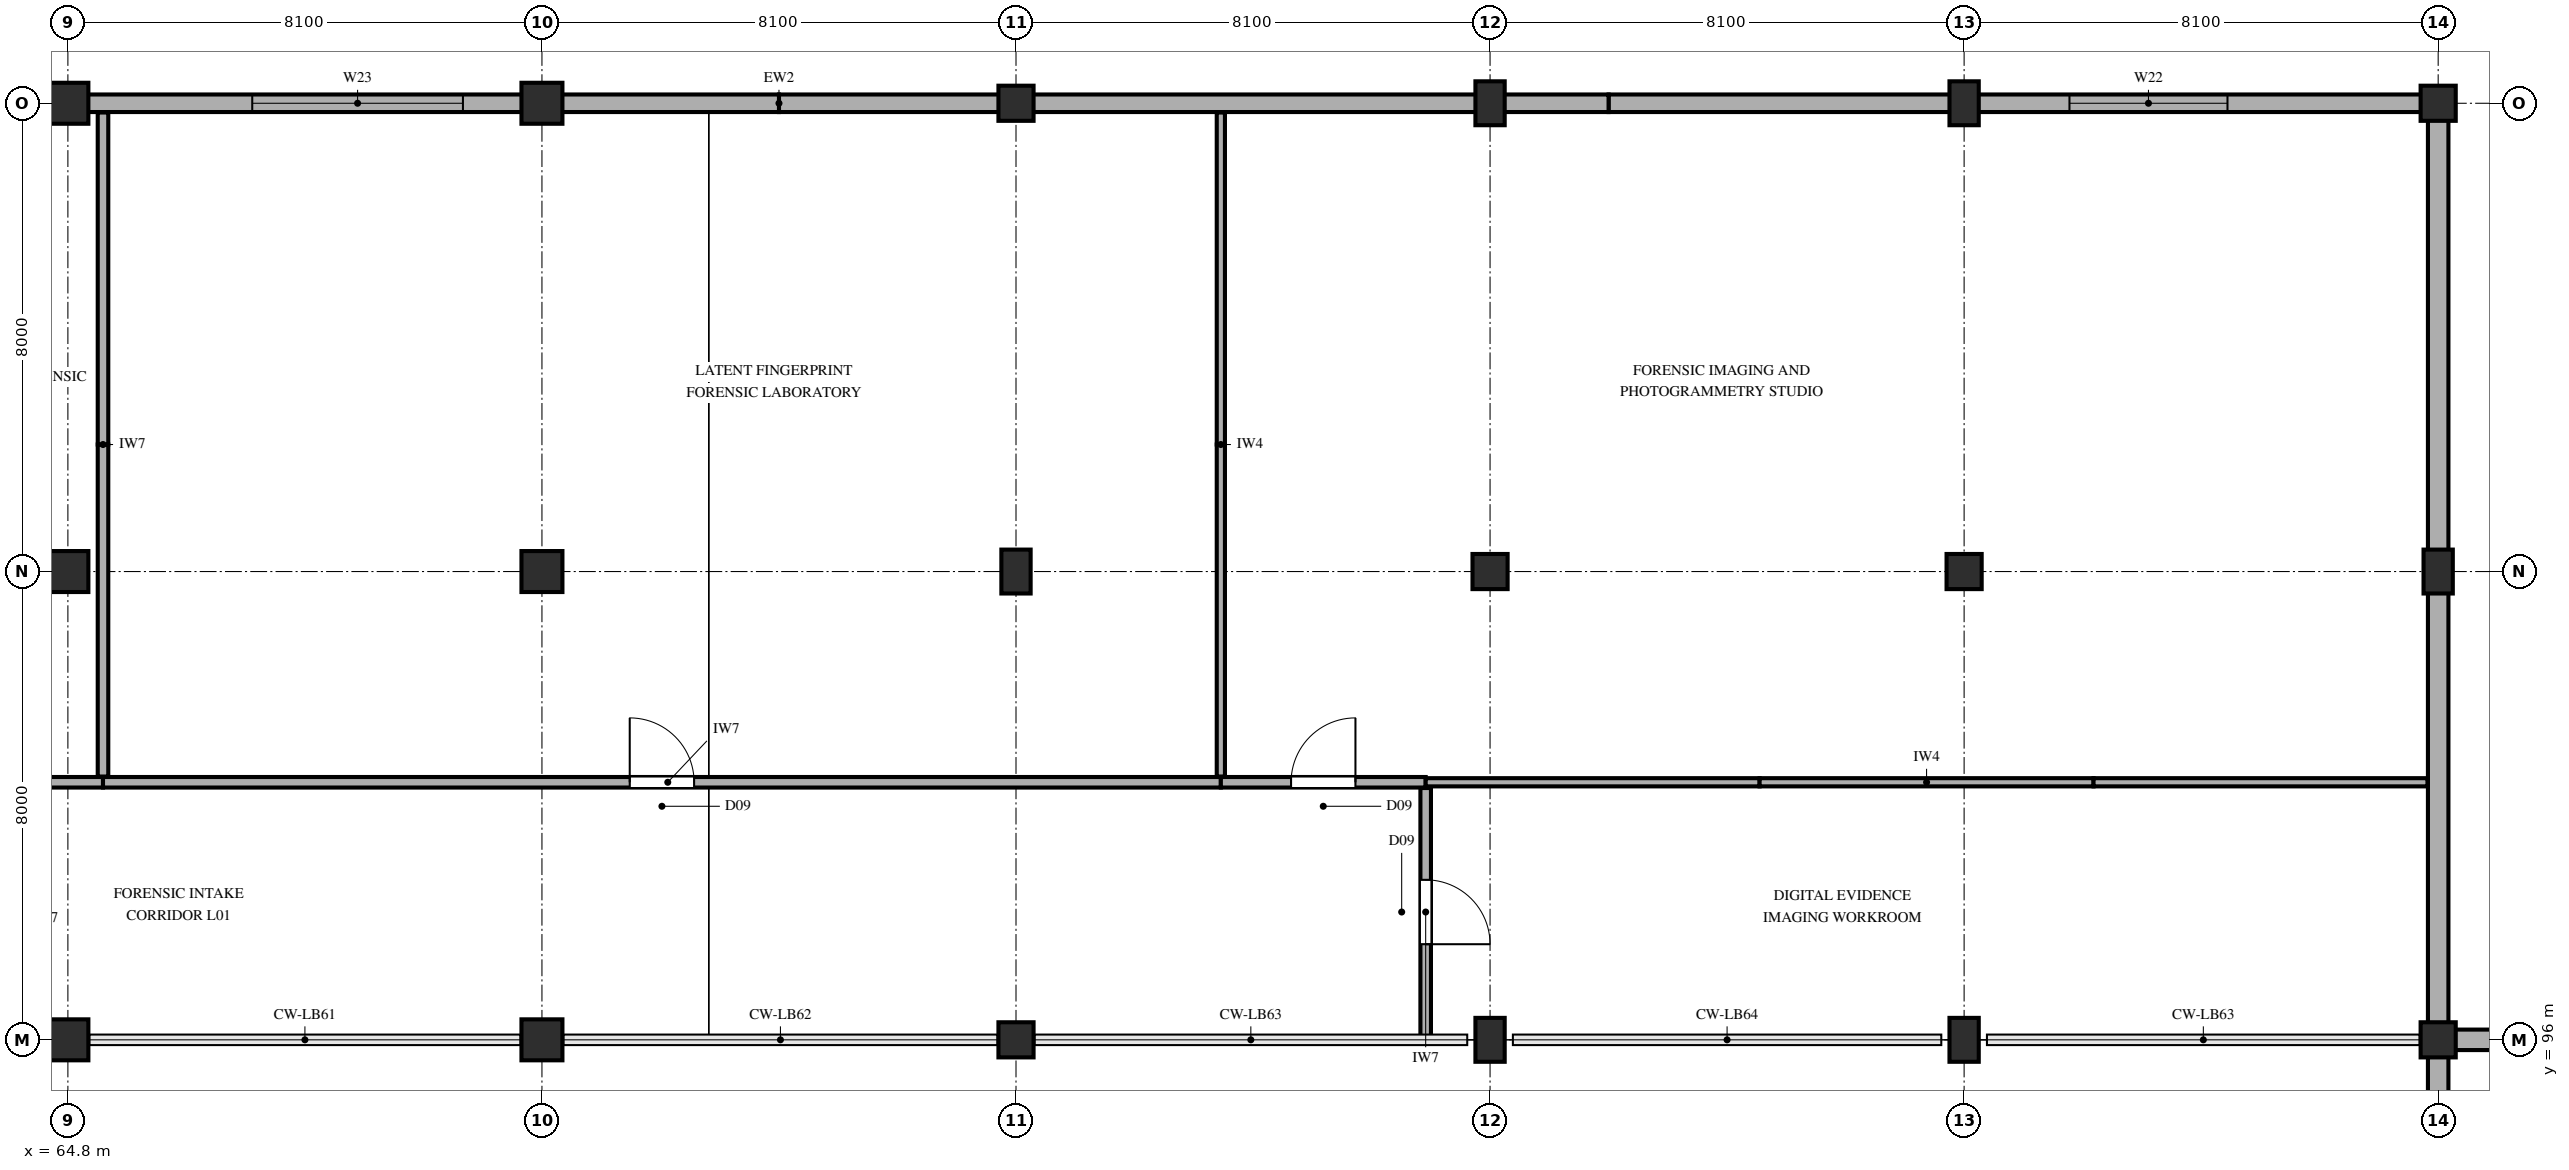
"""IFC4 building model, lengths in metres.
Left out: names, types, materials, properties, quantities, classifications, styles, units other than length and angle.
Written with IfcOpenShell. Run it as: python <this file> out.ifc"""

import sys

from ifc_helpers import new_model, si_unit, direction, frame, frame_2d, origin, origin_2d, place, context, subcontext, project, spatial, rectangle, extrude, element, fill, save


model = new_model("IFC4")
c1 = context("Model", 3, precision=1e-05, world=origin(), true_north=direction((0.0, 1.0)))
c2 = subcontext(c1, "Body", "Model", "MODEL_VIEW")
j1 = project(units=[si_unit("LENGTHUNIT", "METRE"), si_unit("PLANEANGLEUNIT", "RADIAN")], contexts=[c1])
p1 = place(None, origin())
s1 = spatial("IfcSite", under=j1, at=p1, CompositionType="ELEMENT")
p2 = place(p1, origin())
s2 = spatial("IfcBuilding", under=s1, at=p2, CompositionType="ELEMENT")
p3 = place(p2, frame((0.0, 0.0, 5.4)))
s3 = spatial("IfcBuildingStorey", under=s2, at=p3, CompositionType="ELEMENT", Elevation=5.4)
for number, where, z_axis, x_axis in (
    (1, (64.8, 96.0, 0.0), (0.0, 0.0, 1.0), (1.0, 0.0, 0.0)),
    (2, (64.8, 104.0, 0.0), (0.0, 0.0, 1.0), (1.0, 0.0, 0.0)),
    (3, (64.8, 112.0, 0.0), (0.0, 0.0, 1.0), (1.0, 0.0, 0.0)),
    (4, (72.9, 96.0, 0.0), (0.0, 0.0, 1.0), (1.0, 0.0, 0.0)),
    (5, (72.9, 104.0, 0.0), (0.0, 0.0, 1.0), (1.0, 0.0, 0.0)),
    (6, (72.9, 112.0, 0.0), (0.0, 0.0, 1.0), (1.0, 0.0, 0.0)),
):
    element("IfcColumn", number, at=place(p3, frame(where, z_axis=z_axis, x_axis=x_axis)), inside=s3, PredefinedType="COLUMN", context=c2, shape_type="SweptSolid", body=[
        extrude(rectangle(XDim=0.7, YDim=0.7, at=origin_2d()), origin(), (0.0, 0.0, 1.0), 4.8),
    ])
p4 = place(p3, frame((81.0, 96.0, 0.0), z_axis=(0.0, 0.0, 1.0), x_axis=(1.0, 0.0, 0.0)))
e7 = element("IfcColumn", 7, at=p4, inside=s3, PredefinedType="COLUMN", context=c2, shape_type="SweptSolid", body=[
    extrude(rectangle(XDim=0.6, YDim=0.6, at=origin_2d()), origin(), (0.0, 0.0, 1.0), 4.8),
])
p5 = place(p3, frame((81.0, 104.0, 0.0), z_axis=(0.0, 0.0, 1.0), x_axis=(1.0, 0.0, 0.0)))
e8 = element("IfcColumn", 8, at=p5, inside=s3, PredefinedType="COLUMN", context=c2, shape_type="SweptSolid", body=[
    extrude(rectangle(XDim=0.5, YDim=0.75, at=origin_2d()), origin(), (0.0, 0.0, 1.0), 4.8),
])
p6 = place(p3, frame((81.0, 112.0, 0.0), z_axis=(0.0, 0.0, 1.0), x_axis=(1.0, 0.0, 0.0)))
e9 = element("IfcColumn", 9, at=p6, inside=s3, PredefinedType="COLUMN", context=c2, shape_type="SweptSolid", body=[
    extrude(rectangle(XDim=0.6, YDim=0.6, at=origin_2d()), origin(), (0.0, 0.0, 1.0), 4.8),
])
p7 = place(p3, frame((89.1, 96.0, 0.0), z_axis=(0.0, 0.0, 1.0), x_axis=(1.0, 0.0, 0.0)))
e10 = element("IfcColumn", 10, at=p7, inside=s3, PredefinedType="COLUMN", context=c2, shape_type="SweptSolid", body=[
    extrude(rectangle(XDim=0.5, YDim=0.75, at=origin_2d()), origin(), (0.0, 0.0, 1.0), 4.8),
])
p8 = place(p3, frame((89.1, 104.0, 0.0), z_axis=(0.0, 0.0, 1.0), x_axis=(1.0, 0.0, 0.0)))
e11 = element("IfcColumn", 11, at=p8, inside=s3, PredefinedType="COLUMN", context=c2, shape_type="SweptSolid", body=[
    extrude(rectangle(XDim=0.6, YDim=0.6, at=origin_2d()), origin(), (0.0, 0.0, 1.0), 4.8),
])
for number, where, z_axis, x_axis in (
    (12, (89.1, 112.0, 0.0), (0.0, 0.0, 1.0), (1.0, 0.0, 0.0)),
    (13, (97.2, 96.0, 0.0), (0.0, 0.0, 1.0), (1.0, 0.0, 0.0)),
):
    element("IfcColumn", number, at=place(p3, frame(where, z_axis=z_axis, x_axis=x_axis)), inside=s3, PredefinedType="COLUMN", context=c2, shape_type="SweptSolid", body=[
        extrude(rectangle(XDim=0.5, YDim=0.75, at=origin_2d()), origin(), (0.0, 0.0, 1.0), 4.8),
    ])
p9 = place(p3, frame((97.2, 104.0, 0.0), z_axis=(0.0, 0.0, 1.0), x_axis=(1.0, 0.0, 0.0)))
e14 = element("IfcColumn", 14, at=p9, inside=s3, PredefinedType="COLUMN", context=c2, shape_type="SweptSolid", body=[
    extrude(rectangle(XDim=0.6, YDim=0.6, at=origin_2d()), origin(), (0.0, 0.0, 1.0), 4.8),
])
p10 = place(p3, frame((97.2, 112.0, 0.0), z_axis=(0.0, 0.0, 1.0), x_axis=(1.0, 0.0, 0.0)))
e15 = element("IfcColumn", 15, at=p10, inside=s3, PredefinedType="COLUMN", context=c2, shape_type="SweptSolid", body=[
    extrude(rectangle(XDim=0.5, YDim=0.75, at=origin_2d()), origin(), (0.0, 0.0, 1.0), 4.8),
])
p11 = place(p3, frame((105.3, 96.0, 0.0), z_axis=(0.0, 0.0, 1.0), x_axis=(1.0, 0.0, 0.0)))
e16 = element("IfcColumn", 16, at=p11, inside=s3, PredefinedType="COLUMN", context=c2, shape_type="SweptSolid", body=[
    extrude(rectangle(XDim=0.6, YDim=0.6, at=origin_2d()), origin(), (0.0, 0.0, 1.0), 4.8),
])
p12 = place(p3, frame((105.3, 104.0, 0.0), z_axis=(0.0, 0.0, 1.0), x_axis=(1.0, 0.0, 0.0)))
e17 = element("IfcColumn", 17, at=p12, inside=s3, PredefinedType="COLUMN", context=c2, shape_type="SweptSolid", body=[
    extrude(rectangle(XDim=0.5, YDim=0.75, at=origin_2d()), origin(), (0.0, 0.0, 1.0), 4.8),
])
p13 = place(p3, frame((105.3, 112.0, 0.0), z_axis=(0.0, 0.0, 1.0), x_axis=(1.0, 0.0, 0.0)))
e18 = element("IfcColumn", 18, at=p13, inside=s3, PredefinedType="COLUMN", context=c2, shape_type="SweptSolid", body=[
    extrude(rectangle(XDim=0.6, YDim=0.6, at=origin_2d()), origin(), (0.0, 0.0, 1.0), 4.8),
])
p14 = place(p3, frame((105.3, 96.18, 0.0), z_axis=(0.0, 0.0, 1.0), x_axis=(0.0, 1.0, 0.0)))
e19 = element("IfcWall", 19, at=p14, inside=s3, PredefinedType="SOLIDWALL", context=c2, shape_type="SweptSolid", body=[
    extrude(rectangle(XDim=15.82, YDim=0.35, at=frame_2d((7.91, 0.0))), origin(), (0.0, 0.0, 1.0), 3.912),
])
p15 = place(p3, frame((105.3, 112.0, 0.0), z_axis=(0.0, 0.0, 1.0), x_axis=(-1.0, 0.0, 0.0)))
e20 = element("IfcWall", 20, at=p15, inside=s3, PredefinedType="SOLIDWALL", context=c2, shape_type="SweptSolid", body=[
    extrude(rectangle(XDim=14.175, YDim=0.3, at=frame_2d((7.087, 0.0))), origin(), (0.0, 0.0, 1.0), 3.812),
])
p16 = place(p15, frame((3.6, 0.0, 0.95)))
e21 = element("IfcOpeningElement", 21, at=p16, cuts=e20, PredefinedType="OPENING", context=c2, shape_type="SweptSolid", body=[
    extrude(rectangle(XDim=2.7, YDim=0.9, at=frame_2d((1.35, 0.45))), frame((0.0, 0.16, 0.0), z_axis=(0.0, -1.0, 0.0), x_axis=(1.0, 0.0, 0.0)), (0.0, 0.0, 1.0), 0.32),
])
p17 = place(p3, frame((91.125, 112.0, 0.0), z_axis=(0.0, 0.0, 1.0), x_axis=(-1.0, 0.0, 0.0)))
e22 = element("IfcWall", 22, at=p17, inside=s3, PredefinedType="SOLIDWALL", context=c2, shape_type="SweptSolid", body=[
    extrude(rectangle(XDim=14.175, YDim=0.3, at=frame_2d((7.087, 0.0))), origin(), (0.0, 0.0, 1.0), 3.812),
])
p18 = place(p3, frame((76.95, 112.0, 0.0), z_axis=(0.0, 0.0, 1.0), x_axis=(-1.0, 0.0, 0.0)))
e23 = element("IfcWall", 23, at=p18, inside=s3, PredefinedType="SOLIDWALL", context=c2, shape_type="SweptSolid", body=[
    extrude(rectangle(XDim=14.175, YDim=0.3, at=frame_2d((7.087, 0.0))), origin(), (0.0, 0.0, 1.0), 3.812),
])
p19 = place(p18, frame((5.4, 0.0, 0.95)))
e24 = element("IfcOpeningElement", 24, at=p19, cuts=e23, PredefinedType="OPENING", context=c2, shape_type="SweptSolid", body=[
    extrude(rectangle(XDim=3.6, YDim=0.9, at=frame_2d((1.8, 0.45))), frame((0.0, 0.16, 0.0), z_axis=(0.0, -1.0, 0.0), x_axis=(1.0, 0.0, 0.0)), (0.0, 0.0, 1.0), 0.32),
])
p20 = place(p3, frame((117.54, 96.0, 0.0), z_axis=(0.0, 0.0, 1.0), x_axis=(-1.0, 0.0, 0.0)))
e25 = element("IfcWall", 25, at=p20, inside=s3, PredefinedType="SOLIDWALL", context=c2, shape_type="SweptSolid", body=[
    extrude(rectangle(XDim=12.06, YDim=0.35, at=frame_2d((6.03, 0.0))), origin(), (0.0, 0.0, 1.0), 3.312),
])
p21 = place(p20, frame((6.75, 0.0, 0.95)))
e26 = element("IfcOpeningElement", 26, at=p21, cuts=e25, PredefinedType="OPENING", context=c2, shape_type="SweptSolid", body=[
    extrude(rectangle(XDim=2.7, YDim=1.8, at=frame_2d((1.35, 0.9))), frame((0.0, 0.185, 0.0), z_axis=(0.0, -1.0, 0.0), x_axis=(1.0, 0.0, 0.0)), (0.0, 0.0, 1.0), 0.37),
])
p22 = place(p3, frame((105.3, 95.82, 0.0), z_axis=(0.0, 0.0, 1.0), x_axis=(0.0, -1.0, 0.0)))
e27 = element("IfcWall", 27, at=p22, inside=s3, PredefinedType="SOLIDWALL", context=c2, shape_type="SweptSolid", body=[
    extrude(rectangle(XDim=13.273, YDim=0.35, at=frame_2d((6.637, 0.0))), origin(), (0.0, 0.0, 1.0), 3.912),
])
p23 = place(p22, frame((3.15, 0.0, 0.85)))
e28 = element("IfcOpeningElement", 28, at=p23, cuts=e27, PredefinedType="OPENING", context=c2, shape_type="SweptSolid", body=[
    extrude(rectangle(XDim=2.7, YDim=2.1, at=frame_2d((1.35, 1.05))), frame((0.0, 0.185, 0.0), z_axis=(0.0, -1.0, 0.0), x_axis=(1.0, 0.0, 0.0)), (0.0, 0.0, 1.0), 0.37),
])
p24 = place(p3, frame((62.1, 100.4, 0.0), z_axis=(0.0, 0.0, 1.0), x_axis=(1.0, 0.0, 0.0)))
e29 = element("IfcWall", 29, at=p24, inside=s3, PredefinedType="PARTITIONING", context=c2, shape_type="SweptSolid", body=[
    extrude(rectangle(XDim=3.3, YDim=0.18, at=frame_2d((1.65, 0.0))), origin(), (0.0, 0.0, 1.0), 4.52),
])
p25 = place(p24, frame((1.05, 0.0, 0.0)))
e30 = element("IfcOpeningElement", 30, at=p25, cuts=e29, PredefinedType="OPENING", context=c2, shape_type="SweptSolid", body=[
    extrude(rectangle(XDim=1.2, YDim=2.2, at=frame_2d((0.6, 1.1))), frame((0.0, 0.1, 0.0), z_axis=(0.0, -1.0, 0.0), x_axis=(1.0, 0.0, 0.0)), (0.0, 0.0, 1.0), 0.2),
])
p26 = place(p3, frame((65.4, 100.4, 0.0), z_axis=(0.0, 0.0, 1.0), x_axis=(1.0, 0.0, 0.0)))
e31 = element("IfcWall", 31, at=p26, inside=s3, PredefinedType="PARTITIONING", context=c2, shape_type="SweptSolid", body=[
    extrude(rectangle(XDim=19.1, YDim=0.18, at=frame_2d((9.55, 0.0))), origin(), (0.0, 0.0, 1.0), 4.52),
])
p27 = place(p26, frame((9.0, 0.0, 0.0)))
e32 = element("IfcOpeningElement", 32, at=p27, cuts=e31, PredefinedType="OPENING", context=c2, shape_type="SweptSolid", body=[
    extrude(rectangle(XDim=1.1, YDim=2.3, at=frame_2d((0.55, 1.15))), frame((0.0, 0.1, 0.0), z_axis=(0.0, -1.0, 0.0), x_axis=(1.0, 0.0, 0.0)), (0.0, 0.0, 1.0), 0.2),
])
p28 = place(p3, frame((84.5, 100.4, 0.0), z_axis=(0.0, 0.0, 1.0), x_axis=(1.0, 0.0, 0.0)))
e33 = element("IfcWall", 33, at=p28, inside=s3, PredefinedType="PARTITIONING", context=c2, shape_type="SweptSolid", body=[
    extrude(rectangle(XDim=3.5, YDim=0.18, at=frame_2d((1.75, 0.0))), origin(), (0.0, 0.0, 1.0), 4.52),
])
p29 = place(p28, frame((1.2, 0.0, 0.0)))
e34 = element("IfcOpeningElement", 34, at=p29, cuts=e33, PredefinedType="OPENING", context=c2, shape_type="SweptSolid", body=[
    extrude(rectangle(XDim=1.1, YDim=2.3, at=frame_2d((0.55, 1.15))), frame((0.0, 0.1, 0.0), z_axis=(0.0, -1.0, 0.0), x_axis=(1.0, 0.0, 0.0)), (0.0, 0.0, 1.0), 0.2),
])
p30 = place(p3, frame((88.0, 100.4, 0.0), z_axis=(0.0, 0.0, 1.0), x_axis=(1.0, 0.0, 0.0)))
e35 = element("IfcWall", 35, at=p30, inside=s3, PredefinedType="PARTITIONING", context=c2, shape_type="SweptSolid", body=[
    extrude(rectangle(XDim=5.706, YDim=0.14, at=frame_2d((2.853, 0.0))), origin(), (0.0, 0.0, 1.0), 4.52),
])
p31 = place(p3, frame((93.706, 100.4, 0.0), z_axis=(0.0, 0.0, 1.0), x_axis=(1.0, 0.0, 0.0)))
e36 = element("IfcWall", 36, at=p31, inside=s3, PredefinedType="PARTITIONING", context=c2, shape_type="SweptSolid", body=[
    extrude(rectangle(XDim=5.706, YDim=0.14, at=frame_2d((2.853, 0.0))), origin(), (0.0, 0.0, 1.0), 4.52),
])
p32 = place(p3, frame((99.411, 100.4, 0.0), z_axis=(0.0, 0.0, 1.0), x_axis=(1.0, 0.0, 0.0)))
e37 = element("IfcWall", 37, at=p32, inside=s3, PredefinedType="PARTITIONING", context=c2, shape_type="SweptSolid", body=[
    extrude(rectangle(XDim=5.706, YDim=0.14, at=frame_2d((2.853, 0.0))), origin(), (0.0, 0.0, 1.0), 4.52),
])
p33 = place(p3, frame((65.4, 100.498, 0.0), z_axis=(0.0, 0.0, 1.0), x_axis=(0.0, 1.0, 0.0)))
e38 = element("IfcWall", 38, at=p33, inside=s3, PredefinedType="PARTITIONING", context=c2, shape_type="SweptSolid", body=[
    extrude(rectangle(XDim=5.672, YDim=0.18, at=frame_2d((2.836, 0.0))), origin(), (0.0, 0.0, 1.0), 4.52),
])
p34 = place(p3, frame((65.4, 106.17, 0.0), z_axis=(0.0, 0.0, 1.0), x_axis=(0.0, 1.0, 0.0)))
e39 = element("IfcWall", 39, at=p34, inside=s3, PredefinedType="PARTITIONING", context=c2, shape_type="SweptSolid", body=[
    extrude(rectangle(XDim=5.672, YDim=0.18, at=frame_2d((2.836, 0.0))), origin(), (0.0, 0.0, 1.0), 4.52),
])
p35 = place(p3, frame((84.5, 100.498, 0.0), z_axis=(0.0, 0.0, 1.0), x_axis=(0.0, 1.0, 0.0)))
e40 = element("IfcWall", 40, at=p35, inside=s3, PredefinedType="PARTITIONING", context=c2, shape_type="SweptSolid", body=[
    extrude(rectangle(XDim=5.672, YDim=0.14, at=frame_2d((2.836, 0.0))), origin(), (0.0, 0.0, 1.0), 4.52),
])
p36 = place(p3, frame((84.5, 106.17, 0.0), z_axis=(0.0, 0.0, 1.0), x_axis=(0.0, 1.0, 0.0)))
e41 = element("IfcWall", 41, at=p36, inside=s3, PredefinedType="PARTITIONING", context=c2, shape_type="SweptSolid", body=[
    extrude(rectangle(XDim=5.672, YDim=0.14, at=frame_2d((2.836, 0.0))), origin(), (0.0, 0.0, 1.0), 4.52),
])
p37 = place(p3, frame((88.0, 96.065, 0.0), z_axis=(0.0, 0.0, 1.0), x_axis=(0.0, 1.0, 0.0)))
e42 = element("IfcWall", 42, at=p37, inside=s3, PredefinedType="PARTITIONING", context=c2, shape_type="SweptSolid", body=[
    extrude(rectangle(XDim=4.237, YDim=0.18, at=frame_2d((2.119, 0.0))), origin(), (0.0, 0.0, 1.0), 4.52),
])
p38 = place(p37, frame((1.569, 0.0, 0.0)))
e43 = element("IfcOpeningElement", 43, at=p38, cuts=e42, PredefinedType="OPENING", context=c2, shape_type="SweptSolid", body=[
    extrude(rectangle(XDim=1.1, YDim=2.3, at=frame_2d((0.55, 1.15))), frame((0.0, 0.1, 0.0), z_axis=(0.0, -1.0, 0.0), x_axis=(1.0, 0.0, 0.0)), (0.0, 0.0, 1.0), 0.2),
])
p39 = place(p16, origin())
e44 = element("IfcWindow", 44, at=p39, inside=s3, PartitioningType="TRIPLE_PANEL_VERTICAL", PredefinedType="WINDOW", context=c2, shape_type="SweptSolid", body=[
    extrude(rectangle(XDim=2.7, YDim=0.9, at=frame_2d((1.35, 0.45))), frame((0.0, 0.03, 0.0), z_axis=(0.0, -1.0, 0.0), x_axis=(1.0, 0.0, 0.0)), (0.0, 0.0, 1.0), 0.06),
])
fill(e21, e44)
p40 = place(p19, origin())
e45 = element("IfcWindow", 45, at=p40, inside=s3, PartitioningType="TRIPLE_PANEL_VERTICAL", PredefinedType="WINDOW", context=c2, shape_type="SweptSolid", body=[
    extrude(rectangle(XDim=3.6, YDim=0.9, at=frame_2d((1.8, 0.45))), frame((0.0, 0.03, 0.0), z_axis=(0.0, -1.0, 0.0), x_axis=(1.0, 0.0, 0.0)), (0.0, 0.0, 1.0), 0.06),
])
fill(e24, e45)
p41 = place(p27, origin())
e46 = element("IfcDoor", 46, at=p41, inside=s3, OperationType="SINGLE_SWING_LEFT", PredefinedType="DOOR", context=c2, shape_type="SweptSolid", body=[
    extrude(rectangle(XDim=1.1, YDim=2.3, at=frame_2d((0.55, 1.15))), frame((0.0, 0.025, 0.0), z_axis=(0.0, -1.0, 0.0), x_axis=(1.0, 0.0, 0.0)), (0.0, 0.0, 1.0), 0.05),
])
fill(e32, e46)
p42 = place(p29, origin())
e47 = element("IfcDoor", 47, at=p42, inside=s3, OperationType="SINGLE_SWING_RIGHT", PredefinedType="DOOR", context=c2, shape_type="SweptSolid", body=[
    extrude(rectangle(XDim=1.1, YDim=2.3, at=frame_2d((0.55, 1.15))), frame((0.0, 0.025, 0.0), z_axis=(0.0, -1.0, 0.0), x_axis=(1.0, 0.0, 0.0)), (0.0, 0.0, 1.0), 0.05),
])
fill(e34, e47)
p43 = place(p38, frame((1.1, 0.0, 0.0), z_axis=(0.0, 0.0, 1.0), x_axis=(-1.0, 0.0, 0.0)))
e48 = element("IfcDoor", 48, at=p43, inside=s3, OperationType="SINGLE_SWING_LEFT", PredefinedType="DOOR", context=c2, shape_type="SweptSolid", body=[
    extrude(rectangle(XDim=1.1, YDim=2.3, at=frame_2d((0.55, 1.15))), frame((0.0, 0.025, 0.0), z_axis=(0.0, -1.0, 0.0), x_axis=(1.0, 0.0, 0.0)), (0.0, 0.0, 1.0), 0.05),
])
fill(e43, e48)
save(model, sys.argv[1])
